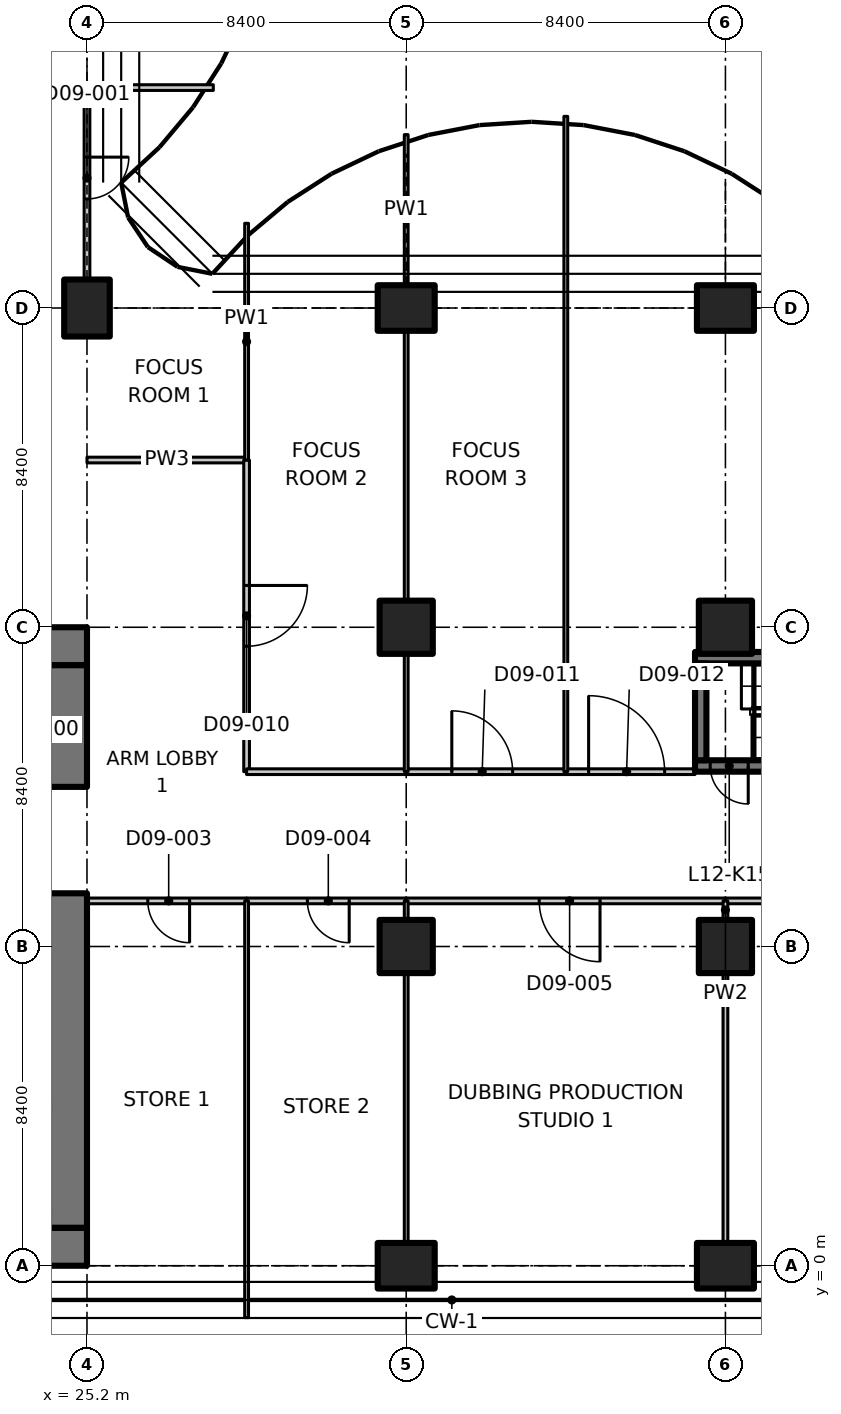
"""IFC4 building model, lengths in metres.
Left out: names, types, materials, properties, quantities, classifications, styles, units other than length and angle.
Written with IfcOpenShell. Run it as: python <this file> out.ifc"""

import sys

from ifc_helpers import new_model, si_unit, direction, frame, frame_2d, origin, origin_2d, place, context, subcontext, project, spatial, polyline, rectangle, outline, extrude, element, fill, save


model = new_model("IFC4")
c1 = context("Model", 3, precision=1e-05, world=origin(), true_north=direction((0.0, 1.0)))
c2 = subcontext(c1, "Body", "Model", "MODEL_VIEW")
j1 = project(units=[si_unit("LENGTHUNIT", "METRE"), si_unit("PLANEANGLEUNIT", "RADIAN")], contexts=[c1])
p1 = place(None, origin())
s1 = spatial("IfcSite", under=j1, at=p1, CompositionType="ELEMENT")
p2 = place(p1, origin())
s2 = spatial("IfcBuilding", under=s1, at=p2, CompositionType="ELEMENT")
p3 = place(p2, frame((0.0, 0.0, 58.1)))
s3 = spatial("IfcBuildingStorey", under=s2, at=p3, CompositionType="ELEMENT", Elevation=58.1)
for number, where, z_axis, x_axis in (
    (1, (25.2, 25.2, 0.0), (0.0, 0.0, 1.0), (1.0, 0.0, 0.0)),
    (2, (33.6, 0.0, 0.0), (0.0, 0.0, 1.0), (0.0, 1.0, 0.0)),
):
    element("IfcColumn", number, at=place(p3, frame(where, z_axis=z_axis, x_axis=x_axis)), inside=s3, PredefinedType="COLUMN", context=c2, shape_type="SweptSolid", body=[
        extrude(rectangle(XDim=1.2, YDim=1.5, at=origin_2d()), origin(), (0.0, 0.0, 1.0), 3.35),
    ])
for number, where, z_axis, x_axis in (
    (3, (33.6, 8.4, 0.0), (0.0, 0.0, 1.0), (1.0, 0.0, 0.0)),
    (4, (33.6, 16.8, 0.0), (0.0, 0.0, 1.0), (1.0, 0.0, 0.0)),
):
    element("IfcColumn", number, at=place(p3, frame(where, z_axis=z_axis, x_axis=x_axis)), inside=s3, PredefinedType="COLUMN", context=c2, shape_type="SweptSolid", body=[
        extrude(rectangle(XDim=1.4, YDim=1.4, at=origin_2d()), origin(), (0.0, 0.0, 1.0), 3.35),
    ])
for number, where, z_axis, x_axis in (
    (5, (33.6, 25.2, 0.0), (0.0, 0.0, 1.0), (0.0, 1.0, 0.0)),
    (6, (42.0, 0.0, 0.0), (0.0, 0.0, 1.0), (0.0, 1.0, 0.0)),
):
    element("IfcColumn", number, at=place(p3, frame(where, z_axis=z_axis, x_axis=x_axis)), inside=s3, PredefinedType="COLUMN", context=c2, shape_type="SweptSolid", body=[
        extrude(rectangle(XDim=1.2, YDim=1.5, at=origin_2d()), origin(), (0.0, 0.0, 1.0), 3.35),
    ])
for number, where, z_axis, x_axis in (
    (7, (42.0, 8.4, 0.0), (0.0, 0.0, 1.0), (1.0, 0.0, 0.0)),
    (8, (42.0, 16.8, 0.0), (0.0, 0.0, 1.0), (1.0, 0.0, 0.0)),
):
    element("IfcColumn", number, at=place(p3, frame(where, z_axis=z_axis, x_axis=x_axis)), inside=s3, PredefinedType="COLUMN", context=c2, shape_type="SweptSolid", body=[
        extrude(rectangle(XDim=1.4, YDim=1.4, at=origin_2d()), origin(), (0.0, 0.0, 1.0), 3.35),
    ])
p4 = place(p3, frame((42.0, 25.2, 0.0), z_axis=(0.0, 0.0, 1.0), x_axis=(0.0, 1.0, 0.0)))
e9 = element("IfcColumn", 9, at=p4, inside=s3, PredefinedType="COLUMN", context=c2, shape_type="SweptSolid", body=[
    extrude(rectangle(XDim=1.2, YDim=1.5, at=origin_2d()), origin(), (0.0, 0.0, 1.0), 3.35),
])
p5 = place(p3, frame((6.936, 0.5, 0.0), z_axis=(0.0, 0.0, 1.0), x_axis=(1.0, 0.0, 0.0)))
e10 = element("IfcWall", 10, at=p5, inside=s3, PredefinedType="SHEAR", context=c2, shape_type="SweptSolid", body=[
    extrude(rectangle(XDim=18.264, YDim=1.0, at=frame_2d((9.132, 0.0))), origin(), (0.0, 0.0, 1.0), 3.35),
])
p6 = place(p3, frame((23.8, 16.3, 0.0), z_axis=(0.0, 0.0, 1.0), x_axis=(1.0, 0.0, 0.0)))
e11 = element("IfcWall", 11, at=p6, inside=s3, PredefinedType="SHEAR", context=c2, shape_type="SweptSolid", body=[
    extrude(rectangle(XDim=1.4, YDim=1.0, at=frame_2d((0.7, 0.0))), origin(), (0.0, 0.0, 1.0), 3.35),
])
p7 = place(p3, frame((24.7, 1.0, 0.0), z_axis=(0.0, 0.0, 1.0), x_axis=(0.0, 1.0, 0.0)))
e12 = element("IfcWall", 12, at=p7, inside=s3, PredefinedType="SHEAR", context=c2, shape_type="SweptSolid", body=[
    extrude(rectangle(XDim=8.8, YDim=1.0, at=frame_2d((4.4, 0.0))), origin(), (0.0, 0.0, 1.0), 3.35),
])
p8 = place(p3, frame((24.7, 12.6, 0.0), z_axis=(0.0, 0.0, 1.0), x_axis=(0.0, 1.0, 0.0)))
e13 = element("IfcWall", 13, at=p8, inside=s3, PredefinedType="SHEAR", context=c2, shape_type="SweptSolid", body=[
    extrude(rectangle(XDim=3.2, YDim=1.0, at=frame_2d((1.6, 0.0))), origin(), (0.0, 0.0, 1.0), 3.35),
])
p9 = place(p3, frame((49.4, 13.15, 0.0), z_axis=(0.0, 0.0, 1.0), x_axis=(-1.0, 0.0, 0.0)))
e14 = element("IfcWall", 14, at=p9, inside=s3, PredefinedType="SHEAR", context=c2, shape_type="SweptSolid", body=[
    extrude(rectangle(XDim=8.2, YDim=0.3, at=frame_2d((4.1, 0.0))), origin(), (0.0, 0.0, 1.0), 3.35),
])
p10 = place(p9, frame((6.8, 0.0, 0.0)))
e15 = element("IfcOpeningElement", 15, at=p10, cuts=e14, PredefinedType="OPENING", context=c2, shape_type="SweptSolid", body=[
    extrude(rectangle(XDim=1.0, YDim=2.1, at=frame_2d((0.5, 1.05))), frame((0.0, 0.16, 0.0), z_axis=(0.0, -1.0, 0.0), x_axis=(1.0, 0.0, 0.0)), (0.0, 0.0, 1.0), 0.32),
])
p11 = place(p3, frame((41.2, 16.0, 0.0), z_axis=(0.0, 0.0, 1.0), x_axis=(1.0, 0.0, 0.0)))
e16 = element("IfcWall", 16, at=p11, inside=s3, PredefinedType="SHEAR", context=c2, shape_type="SweptSolid", body=[
    extrude(rectangle(XDim=8.2, YDim=0.3, at=frame_2d((4.1, 0.0))), origin(), (0.0, 0.0, 1.0), 3.35),
])
p12 = place(p3, frame((41.35, 13.3, 0.0), z_axis=(0.0, 0.0, 1.0), x_axis=(0.0, 1.0, 0.0)))
e17 = element("IfcWall", 17, at=p12, inside=s3, PredefinedType="SHEAR", context=c2, shape_type="SweptSolid", body=[
    extrude(rectangle(XDim=2.55, YDim=0.3, at=frame_2d((1.275, 0.0))), origin(), (0.0, 0.0, 1.0), 3.35),
])
p13 = place(p3, frame((25.2, 21.2, 0.0), z_axis=(0.0, 0.0, 1.0), x_axis=(1.0, 0.0, 0.0)))
e18 = element("IfcWall", 18, at=p13, inside=s3, PredefinedType="PARTITIONING", context=c2, shape_type="SweptSolid", body=[
    extrude(rectangle(XDim=4.2, YDim=0.15, at=frame_2d((2.1, 0.0))), origin(), (0.0, 0.0, 1.0), 3.33),
])
p14 = place(p3, frame((29.4, 9.6, 0.0), z_axis=(0.0, 0.0, 1.0), x_axis=(-1.0, 0.0, 0.0)))
e19 = element("IfcWall", 19, at=p14, inside=s3, PredefinedType="PARTITIONING", context=c2, shape_type="SweptSolid", body=[
    extrude(rectangle(XDim=4.2, YDim=0.15, at=frame_2d((2.1, 0.0))), origin(), (0.0, 0.0, 1.0), 3.33),
])
p15 = place(p14, frame((1.5, 0.0, 0.0)))
e20 = element("IfcOpeningElement", 20, at=p15, cuts=e19, PredefinedType="OPENING", context=c2, shape_type="SweptSolid", body=[
    extrude(rectangle(XDim=1.1, YDim=2.1, at=frame_2d((0.55, 1.05))), frame((0.0, 0.085, 0.0), z_axis=(0.0, -1.0, 0.0), x_axis=(1.0, 0.0, 0.0)), (0.0, 0.0, 1.0), 0.17),
])
p16 = place(p3, frame((29.4, 21.2, 0.0), z_axis=(0.0, 0.0, 1.0), x_axis=(0.0, -1.0, 0.0)))
e21 = element("IfcWall", 21, at=p16, inside=s3, PredefinedType="PARTITIONING", context=c2, shape_type="SweptSolid", body=[
    extrude(rectangle(XDim=8.2, YDim=0.15, at=frame_2d((4.1, 0.0))), origin(), (0.0, 0.0, 1.0), 3.33),
])
p17 = place(p16, frame((3.3, 0.0, 0.0)))
e22 = element("IfcOpeningElement", 22, at=p17, cuts=e21, PredefinedType="OPENING", context=c2, shape_type="SweptSolid", body=[
    extrude(rectangle(XDim=1.6, YDim=2.1, at=frame_2d((0.8, 1.05))), frame((0.0, 0.085, 0.0), z_axis=(0.0, -1.0, 0.0), x_axis=(1.0, 0.0, 0.0)), (0.0, 0.0, 1.0), 0.17),
])
p18 = place(p3, frame((29.4, 27.429, 0.0), z_axis=(0.0, 0.0, 1.0), x_axis=(0.0, -1.0, 0.0)))
e23 = element("IfcWall", 23, at=p18, inside=s3, PredefinedType="PARTITIONING", context=c2, shape_type="SweptSolid", body=[
    extrude(outline(polyline([(0.0, 0.0), (6.229, 0.0), (6.229, 3.33), (2.679, 3.33), (2.677, 2.98), (1.781, 2.98), (1.779, 3.33), (0.154, 3.33), (0.0, 3.33), (0.0, 0.0)])), frame((0.0, 0.05, 0.0), z_axis=(0.0, -1.0, 0.0), x_axis=(1.0, 0.0, 0.0)), (0.0, 0.0, 1.0), 0.1),
])
p19 = place(p3, frame((25.2, 31.0, 0.0), z_axis=(0.0, 0.0, 1.0), x_axis=(0.0, -1.0, 0.0)))
e24 = element("IfcWall", 24, at=p19, inside=s3, PredefinedType="PARTITIONING", context=c2, shape_type="SweptSolid", body=[
    extrude(outline(polyline([(0.0, 0.0), (5.03, 0.0), (5.03, 2.98), (0.0, 2.98), (0.0, 0.0)])), frame((0.0, 0.075, 0.0), z_axis=(0.0, -1.0, 0.0), x_axis=(1.0, 0.0, 0.0)), (0.0, 0.0, 1.0), 0.15),
])
p20 = place(p19, frame((1.83, 0.0, 0.0)))
e25 = element("IfcOpeningElement", 25, at=p20, cuts=e24, PredefinedType="OPENING", context=c2, shape_type="SweptSolid", body=[
    extrude(rectangle(XDim=1.1, YDim=2.1, at=frame_2d((0.55, 1.05))), frame((0.0, 0.085, 0.0), z_axis=(0.0, -1.0, 0.0), x_axis=(1.0, 0.0, 0.0)), (0.0, 0.0, 1.0), 0.17),
])
p21 = place(p3, frame((25.2, 31.0, 0.0), z_axis=(0.0, 0.0, 1.0), x_axis=(1.0, 0.0, 0.0)))
e26 = element("IfcWall", 26, at=p21, inside=s3, PredefinedType="PARTITIONING", context=c2, shape_type="SweptSolid", body=[
    extrude(rectangle(XDim=3.324, YDim=0.15, at=frame_2d((1.662, 0.0))), origin(), (0.0, 0.0, 1.0), 2.98),
])
p22 = place(p3, frame((33.6, 9.6, 0.0), z_axis=(0.0, 0.0, 1.0), x_axis=(-1.0, 0.0, 0.0)))
e27 = element("IfcWall", 27, at=p22, inside=s3, PredefinedType="PARTITIONING", context=c2, shape_type="SweptSolid", body=[
    extrude(rectangle(XDim=4.2, YDim=0.15, at=frame_2d((2.1, 0.0))), origin(), (0.0, 0.0, 1.0), 3.33),
])
p23 = place(p22, frame((1.5, 0.0, 0.0)))
e28 = element("IfcOpeningElement", 28, at=p23, cuts=e27, PredefinedType="OPENING", context=c2, shape_type="SweptSolid", body=[
    extrude(rectangle(XDim=1.1, YDim=2.1, at=frame_2d((0.55, 1.05))), frame((0.0, 0.085, 0.0), z_axis=(0.0, -1.0, 0.0), x_axis=(1.0, 0.0, 0.0)), (0.0, 0.0, 1.0), 0.17),
])
p24 = place(p3, frame((42.0, 9.6, 0.0), z_axis=(0.0, 0.0, 1.0), x_axis=(-1.0, 0.0, 0.0)))
e29 = element("IfcWall", 29, at=p24, inside=s3, PredefinedType="PARTITIONING", context=c2, shape_type="SweptSolid", body=[
    extrude(rectangle(XDim=8.4, YDim=0.15, at=frame_2d((4.2, 0.0))), origin(), (0.0, 0.0, 1.0), 3.33),
])
p25 = place(p24, frame((3.3, 0.0, 0.0)))
e30 = element("IfcOpeningElement", 30, at=p25, cuts=e29, PredefinedType="OPENING", context=c2, shape_type="SweptSolid", body=[
    extrude(rectangle(XDim=1.6, YDim=2.1, at=frame_2d((0.8, 1.05))), frame((0.0, 0.085, 0.0), z_axis=(0.0, -1.0, 0.0), x_axis=(1.0, 0.0, 0.0)), (0.0, 0.0, 1.0), 0.17),
])
p26 = place(p3, frame((54.6, 9.6, 0.0), z_axis=(0.0, 0.0, 1.0), x_axis=(-1.0, 0.0, 0.0)))
e31 = element("IfcWall", 31, at=p26, inside=s3, PredefinedType="PARTITIONING", context=c2, shape_type="SweptSolid", body=[
    extrude(rectangle(XDim=12.6, YDim=0.15, at=frame_2d((6.3, 0.0))), origin(), (0.0, 0.0, 1.0), 3.33),
])
p27 = place(p26, frame((5.4, 0.0, 0.0)))
e32 = element("IfcOpeningElement", 32, at=p27, cuts=e31, PredefinedType="OPENING", context=c2, shape_type="SweptSolid", body=[
    extrude(rectangle(XDim=1.8, YDim=2.1, at=frame_2d((0.9, 1.05))), frame((0.0, 0.085, 0.0), z_axis=(0.0, -1.0, 0.0), x_axis=(1.0, 0.0, 0.0)), (0.0, 0.0, 1.0), 0.17),
])
p28 = place(p3, frame((29.4, 13.0, 0.0), z_axis=(0.0, 0.0, 1.0), x_axis=(1.0, 0.0, 0.0)))
e33 = element("IfcWall", 33, at=p28, inside=s3, PredefinedType="PARTITIONING", context=c2, shape_type="SweptSolid", body=[
    extrude(rectangle(XDim=4.2, YDim=0.15, at=frame_2d((2.1, 0.0))), origin(), (0.0, 0.0, 1.0), 3.33),
])
p29 = place(p3, frame((33.6, 13.0, 0.0), z_axis=(0.0, 0.0, 1.0), x_axis=(1.0, 0.0, 0.0)))
e34 = element("IfcWall", 34, at=p29, inside=s3, PredefinedType="PARTITIONING", context=c2, shape_type="SweptSolid", body=[
    extrude(rectangle(XDim=4.2, YDim=0.15, at=frame_2d((2.1, 0.0))), origin(), (0.0, 0.0, 1.0), 3.33),
])
p30 = place(p29, frame((1.2, 0.0, 0.0)))
e35 = element("IfcOpeningElement", 35, at=p30, cuts=e34, PredefinedType="OPENING", context=c2, shape_type="SweptSolid", body=[
    extrude(rectangle(XDim=1.6, YDim=2.1, at=frame_2d((0.8, 1.05))), frame((0.0, 0.085, 0.0), z_axis=(0.0, -1.0, 0.0), x_axis=(1.0, 0.0, 0.0)), (0.0, 0.0, 1.0), 0.17),
])
p31 = place(p3, frame((37.8, 13.0, 0.0), z_axis=(0.0, 0.0, 1.0), x_axis=(1.0, 0.0, 0.0)))
e36 = element("IfcWall", 36, at=p31, inside=s3, PredefinedType="PARTITIONING", context=c2, shape_type="SweptSolid", body=[
    extrude(rectangle(XDim=3.4, YDim=0.15, at=frame_2d((1.7, 0.0))), origin(), (0.0, 0.0, 1.0), 3.33),
])
p32 = place(p31, frame((0.6, 0.0, 0.0)))
e37 = element("IfcOpeningElement", 37, at=p32, cuts=e36, PredefinedType="OPENING", context=c2, shape_type="SweptSolid", body=[
    extrude(rectangle(XDim=2.0, YDim=2.4, at=frame_2d((1.0, 1.2))), frame((0.0, 0.085, 0.0), z_axis=(0.0, -1.0, 0.0), x_axis=(1.0, 0.0, 0.0)), (0.0, 0.0, 1.0), 0.17),
])
p33 = place(p3, frame((29.4, 9.6, 0.0), z_axis=(0.0, 0.0, 1.0), x_axis=(0.0, -1.0, 0.0)))
e38 = element("IfcWall", 38, at=p33, inside=s3, PredefinedType="PARTITIONING", context=c2, shape_type="SweptSolid", body=[
    extrude(outline(polyline([(0.0, 0.0), (10.965, 0.0), (10.965, 3.33), (10.7, 3.33), (10.05, 3.33), (10.048, 2.98), (9.152, 2.98), (9.15, 3.33), (0.0, 3.33), (0.0, 0.0)])), frame((0.0, 0.05, 0.0), z_axis=(0.0, -1.0, 0.0), x_axis=(1.0, 0.0, 0.0)), (0.0, 0.0, 1.0), 0.1),
])
p34 = place(p3, frame((33.6, 9.6, 0.0), z_axis=(0.0, 0.0, 1.0), x_axis=(0.0, -1.0, 0.0)))
e39 = element("IfcWall", 39, at=p34, inside=s3, PredefinedType="PARTITIONING", context=c2, shape_type="SweptSolid", body=[
    extrude(rectangle(XDim=0.48, YDim=0.1, at=frame_2d((0.24, 0.0))), origin(), (0.0, 0.0, 1.0), 3.33),
])
p35 = place(p3, frame((33.6, 7.68, 0.0), z_axis=(0.0, 0.0, 1.0), x_axis=(0.0, -1.0, 0.0)))
e40 = element("IfcWall", 40, at=p35, inside=s3, PredefinedType="PARTITIONING", context=c2, shape_type="SweptSolid", body=[
    extrude(rectangle(XDim=7.06, YDim=0.1, at=frame_2d((3.53, 0.0))), origin(), (0.0, 0.0, 1.0), 3.33),
])
p36 = place(p3, frame((42.0, 9.6, 0.0), z_axis=(0.0, 0.0, 1.0), x_axis=(0.0, -1.0, 0.0)))
e41 = element("IfcWall", 41, at=p36, inside=s3, PredefinedType="PARTITIONING", context=c2, shape_type="SweptSolid", body=[
    extrude(rectangle(XDim=0.48, YDim=0.125, at=frame_2d((0.24, 0.0))), origin(), (0.0, 0.0, 1.0), 3.33),
])
p37 = place(p3, frame((42.0, 7.68, 0.0), z_axis=(0.0, 0.0, 1.0), x_axis=(0.0, -1.0, 0.0)))
e42 = element("IfcWall", 42, at=p37, inside=s3, PredefinedType="PARTITIONING", context=c2, shape_type="SweptSolid", body=[
    extrude(rectangle(XDim=7.06, YDim=0.125, at=frame_2d((3.53, 0.0))), origin(), (0.0, 0.0, 1.0), 3.33),
])
p38 = place(p3, frame((33.6, 29.762, 0.0), z_axis=(0.0, 0.0, 1.0), x_axis=(0.0, -1.0, 0.0)))
e43 = element("IfcWall", 43, at=p38, inside=s3, PredefinedType="PARTITIONING", context=c2, shape_type="SweptSolid", body=[
    extrude(rectangle(XDim=3.942, YDim=0.1, at=frame_2d((1.971, 0.0))), origin(), (0.0, 0.0, 1.0), 2.98),
])
p39 = place(p3, frame((33.6, 24.58, 0.0), z_axis=(0.0, 0.0, 1.0), x_axis=(0.0, -1.0, 0.0)))
e44 = element("IfcWall", 44, at=p39, inside=s3, PredefinedType="PARTITIONING", context=c2, shape_type="SweptSolid", body=[
    extrude(rectangle(XDim=7.06, YDim=0.1, at=frame_2d((3.53, 0.0))), origin(), (0.0, 0.0, 1.0), 3.33),
])
p40 = place(p3, frame((33.6, 16.08, 0.0), z_axis=(0.0, 0.0, 1.0), x_axis=(0.0, -1.0, 0.0)))
e45 = element("IfcWall", 45, at=p40, inside=s3, PredefinedType="PARTITIONING", context=c2, shape_type="SweptSolid", body=[
    extrude(rectangle(XDim=3.08, YDim=0.1, at=frame_2d((1.54, 0.0))), origin(), (0.0, 0.0, 1.0), 3.33),
])
p41 = place(p3, frame((37.8, 30.243, 0.0), z_axis=(0.0, 0.0, 1.0), x_axis=(0.0, -1.0, 0.0)))
e46 = element("IfcWall", 46, at=p41, inside=s3, PredefinedType="PARTITIONING", context=c2, shape_type="SweptSolid", body=[
    extrude(outline(polyline([(0.0, 0.0), (17.243, 0.0), (17.243, 3.33), (5.493, 3.33), (5.491, 2.98), (4.595, 2.98), (4.593, 3.33), (0.0, 3.33), (0.0, 0.0)])), frame((0.0, 0.05, 0.0), z_axis=(0.0, -1.0, 0.0), x_axis=(1.0, 0.0, 0.0)), (0.0, 0.0, 1.0), 0.1),
])
p42 = place(p10, origin())
e47 = element("IfcDoor", 47, at=p42, inside=s3, OperationType="SINGLE_SWING_RIGHT", PredefinedType="DOOR", context=c2, shape_type="SweptSolid", body=[
    extrude(rectangle(XDim=1.0, YDim=2.1, at=frame_2d((0.5, 1.05))), frame((0.0, 0.025, 0.0), z_axis=(0.0, -1.0, 0.0), x_axis=(1.0, 0.0, 0.0)), (0.0, 0.0, 1.0), 0.05),
])
fill(e15, e47)
p43 = place(p20, origin())
e48 = element("IfcDoor", 48, at=p43, inside=s3, OperationType="SINGLE_SWING_RIGHT", PredefinedType="DOOR", context=c2, shape_type="SweptSolid", body=[
    extrude(rectangle(XDim=1.1, YDim=2.1, at=frame_2d((0.55, 1.05))), frame((0.0, 0.025, 0.0), z_axis=(0.0, -1.0, 0.0), x_axis=(1.0, 0.0, 0.0)), (0.0, 0.0, 1.0), 0.05),
])
fill(e25, e48)
p44 = place(p15, origin())
e49 = element("IfcDoor", 49, at=p44, inside=s3, OperationType="SINGLE_SWING_LEFT", PredefinedType="DOOR", context=c2, shape_type="SweptSolid", body=[
    extrude(rectangle(XDim=1.1, YDim=2.1, at=frame_2d((0.55, 1.05))), frame((0.0, 0.025, 0.0), z_axis=(0.0, -1.0, 0.0), x_axis=(1.0, 0.0, 0.0)), (0.0, 0.0, 1.0), 0.05),
])
fill(e20, e49)
p45 = place(p23, origin())
e50 = element("IfcDoor", 50, at=p45, inside=s3, OperationType="SINGLE_SWING_LEFT", PredefinedType="DOOR", context=c2, shape_type="SweptSolid", body=[
    extrude(rectangle(XDim=1.1, YDim=2.1, at=frame_2d((0.55, 1.05))), frame((0.0, 0.025, 0.0), z_axis=(0.0, -1.0, 0.0), x_axis=(1.0, 0.0, 0.0)), (0.0, 0.0, 1.0), 0.05),
])
fill(e28, e50)
p46 = place(p25, origin())
e51 = element("IfcDoor", 51, at=p46, inside=s3, OperationType="DOUBLE_DOOR_SINGLE_SWING", PredefinedType="DOOR", context=c2, shape_type="SweptSolid", body=[
    extrude(rectangle(XDim=1.6, YDim=2.1, at=frame_2d((0.8, 1.05))), frame((0.0, 0.025, 0.0), z_axis=(0.0, -1.0, 0.0), x_axis=(1.0, 0.0, 0.0)), (0.0, 0.0, 1.0), 0.05),
])
fill(e30, e51)
p47 = place(p17, origin())
e52 = element("IfcDoor", 52, at=p47, inside=s3, OperationType="DOUBLE_DOOR_SINGLE_SWING", PredefinedType="DOOR", context=c2, shape_type="SweptSolid", body=[
    extrude(rectangle(XDim=1.6, YDim=2.1, at=frame_2d((0.8, 1.05))), frame((0.0, 0.025, 0.0), z_axis=(0.0, -1.0, 0.0), x_axis=(1.0, 0.0, 0.0)), (0.0, 0.0, 1.0), 0.05),
])
fill(e22, e52)
p48 = place(p30, origin())
e53 = element("IfcDoor", 53, at=p48, inside=s3, OperationType="DOUBLE_DOOR_SINGLE_SWING", PredefinedType="DOOR", context=c2, shape_type="SweptSolid", body=[
    extrude(rectangle(XDim=1.6, YDim=2.1, at=frame_2d((0.8, 1.05))), frame((0.0, 0.025, 0.0), z_axis=(0.0, -1.0, 0.0), x_axis=(1.0, 0.0, 0.0)), (0.0, 0.0, 1.0), 0.05),
])
fill(e35, e53)
p49 = place(p32, origin())
e54 = element("IfcDoor", 54, at=p49, inside=s3, OperationType="DOUBLE_DOOR_SINGLE_SWING", PredefinedType="DOOR", context=c2, shape_type="SweptSolid", body=[
    extrude(rectangle(XDim=2.0, YDim=2.4, at=frame_2d((1.0, 1.2))), frame((0.0, 0.025, 0.0), z_axis=(0.0, -1.0, 0.0), x_axis=(1.0, 0.0, 0.0)), (0.0, 0.0, 1.0), 0.05),
])
fill(e37, e54)
save(model, sys.argv[1])
